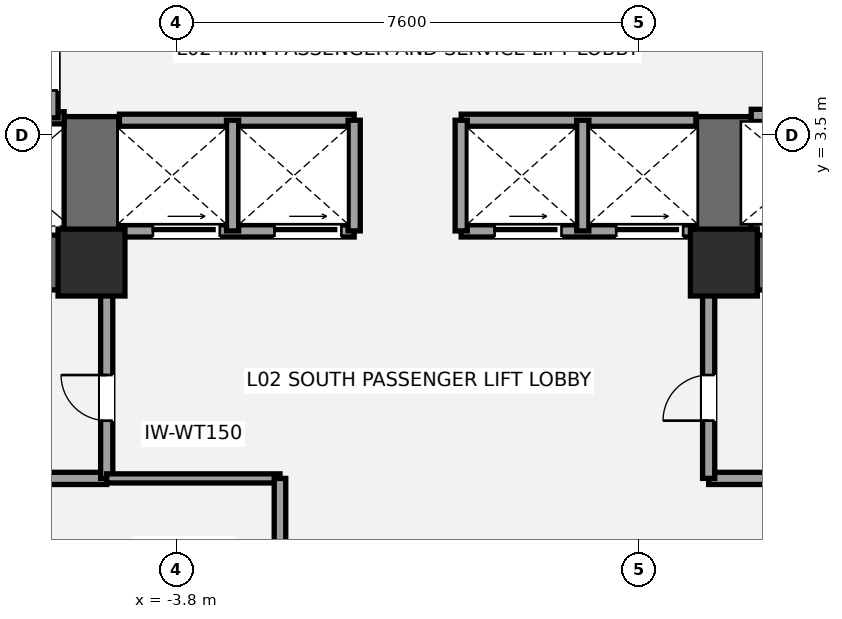
"""IFC4 building model, lengths in metres.
Left out: names, types, materials, properties, quantities, classifications, styles, units other than length and angle.
Written with IfcOpenShell. Run it as: python <this file> out.ifc"""

import sys

from ifc_helpers import new_model, si_unit, direction, frame, frame_2d, origin, origin_2d, place, context, subcontext, project, spatial, rectangle, extrude, element, fill, save


model = new_model("IFC4")
c1 = context("Model", 3, precision=1e-05, world=origin(), true_north=direction((0.0, 1.0)))
c2 = subcontext(c1, "Body", "Model", "MODEL_VIEW")
j1 = project(units=[si_unit("LENGTHUNIT", "METRE"), si_unit("PLANEANGLEUNIT", "RADIAN")], contexts=[c1])
p1 = place(None, origin())
s1 = spatial("IfcSite", under=j1, at=p1, CompositionType="ELEMENT")
p2 = place(p1, origin())
s2 = spatial("IfcBuilding", under=s1, at=p2, CompositionType="ELEMENT")
p3 = place(p2, frame((0.0, 0.0, 10.2)))
s3 = spatial("IfcBuildingStorey", under=s2, at=p3, CompositionType="ELEMENT", Elevation=10.2)
p4 = place(p3, frame((-4.75, 1.4, 0.0), z_axis=(0.0, 0.0, 1.0), x_axis=(-1.0, 0.0, 0.0)))
e1 = element("IfcWall", 1, at=p4, inside=s3, PredefinedType="SHEAR", context=c2, shape_type="SweptSolid", body=[
    extrude(rectangle(XDim=9.3, YDim=0.9, at=frame_2d((4.65, 0.0))), origin(), (0.0, 0.0, 1.0), 4.2),
])
p5 = place(p4, frame((5.55, 0.0, 0.0)))
e2 = element("IfcOpeningElement", 2, at=p5, cuts=e1, PredefinedType="OPENING", context=c2, shape_type="SweptSolid", body=[
    extrude(rectangle(XDim=1.05, YDim=2.15, at=frame_2d((0.525, 1.075))), frame((0.0, 0.46, 0.0), z_axis=(0.0, -1.0, 0.0), x_axis=(1.0, 0.0, 0.0)), (0.0, 0.0, 1.0), 0.92),
])
p6 = place(p4, frame((3.88, 0.0, 0.0)))
e3 = element("IfcOpeningElement", 3, at=p6, cuts=e1, PredefinedType="OPENING", context=c2, shape_type="SweptSolid", body=[
    extrude(rectangle(XDim=1.1, YDim=2.2, at=frame_2d((0.55, 1.1))), frame((0.0, 0.46, 0.0), z_axis=(0.0, -1.0, 0.0), x_axis=(1.0, 0.0, 0.0)), (0.0, 0.0, 1.0), 0.92),
])
p7 = place(p3, frame((-5.2, 0.95, 0.0), z_axis=(0.0, 0.0, 1.0), x_axis=(0.0, 1.0, 0.0)))
e4 = element("IfcWall", 4, at=p7, inside=s3, PredefinedType="SHEAR", context=c2, shape_type="SweptSolid", body=[
    extrude(rectangle(XDim=2.85, YDim=0.9, at=frame_2d((1.425, 0.0))), origin(), (0.0, 0.0, 1.0), 4.2),
])
p8 = place(p3, frame((14.05, 1.4, 0.0), z_axis=(0.0, 0.0, 1.0), x_axis=(-1.0, 0.0, 0.0)))
e5 = element("IfcWall", 5, at=p8, inside=s3, PredefinedType="SHEAR", context=c2, shape_type="SweptSolid", body=[
    extrude(rectangle(XDim=9.3, YDim=0.9, at=frame_2d((4.65, 0.0))), origin(), (0.0, 0.0, 1.0), 4.2),
])
p9 = place(p8, frame((2.7, 0.0, 0.0)))
e6 = element("IfcOpeningElement", 6, at=p9, cuts=e5, PredefinedType="OPENING", context=c2, shape_type="SweptSolid", body=[
    extrude(rectangle(XDim=1.05, YDim=2.15, at=frame_2d((0.525, 1.075))), frame((0.0, 0.46, 0.0), z_axis=(0.0, -1.0, 0.0), x_axis=(1.0, 0.0, 0.0)), (0.0, 0.0, 1.0), 0.92),
])
p10 = place(p8, frame((4.7, 0.0, 0.0)))
e7 = element("IfcOpeningElement", 7, at=p10, cuts=e5, PredefinedType="OPENING", context=c2, shape_type="SweptSolid", body=[
    extrude(rectangle(XDim=1.1, YDim=2.2, at=frame_2d((0.55, 1.1))), frame((0.0, 0.46, 0.0), z_axis=(0.0, -1.0, 0.0), x_axis=(1.0, 0.0, 0.0)), (0.0, 0.0, 1.0), 0.92),
])
p11 = place(p3, frame((5.2, 0.95, 0.0), z_axis=(0.0, 0.0, 1.0), x_axis=(0.0, 1.0, 0.0)))
e8 = element("IfcWall", 8, at=p11, inside=s3, PredefinedType="SHEAR", context=c2, shape_type="SweptSolid", body=[
    extrude(rectangle(XDim=2.85, YDim=0.9, at=frame_2d((1.425, 0.0))), origin(), (0.0, 0.0, 1.0), 4.2),
])
for number, where, z_axis, x_axis in (
    (9, (-5.2, 1.4, 0.0), (0.0, 0.0, 1.0), (1.0, 0.0, 0.0)),
    (10, (5.2, 1.4, 0.0), (0.0, 0.0, 1.0), (1.0, 0.0, 0.0)),
):
    element("IfcColumn", number, at=place(p3, frame(where, z_axis=z_axis, x_axis=x_axis)), inside=s3, PredefinedType="COLUMN", context=c2, shape_type="SweptSolid", body=[
        extrude(rectangle(XDim=1.1, YDim=1.1, at=origin_2d()), origin(), (0.0, 0.0, 1.0), 4.2),
    ])
p12 = place(p3, frame((-7.2, -2.15, 0.0), z_axis=(0.0, 0.0, 1.0), x_axis=(1.0, 0.0, 0.0)))
e11 = element("IfcWall", 11, at=p12, inside=s3, PredefinedType="SOLIDWALL", context=c2, shape_type="SweptSolid", body=[
    extrude(rectangle(XDim=2.25, YDim=0.2, at=frame_2d((1.125, 0.0))), origin(), (0.0, 0.0, 1.0), 3.98),
])
p13 = place(p3, frame((-4.95, -2.15, 0.0), z_axis=(0.0, 0.0, 1.0), x_axis=(0.0, 1.0, 0.0)))
e12 = element("IfcWall", 12, at=p13, inside=s3, PredefinedType="SOLIDWALL", context=c2, shape_type="SweptSolid", body=[
    extrude(rectangle(XDim=3.15, YDim=0.2, at=frame_2d((1.575, 0.0))), origin(), (0.0, 0.0, 1.0), 3.348),
])
p14 = place(p13, frame((0.95, 0.0, 0.0)))
e13 = element("IfcOpeningElement", 13, at=p14, cuts=e12, PredefinedType="OPENING", context=c2, shape_type="SweptSolid", body=[
    extrude(rectangle(XDim=0.75, YDim=2.1, at=frame_2d((0.375, 1.05))), frame((0.0, 0.11, 0.0), z_axis=(0.0, -1.0, 0.0), x_axis=(1.0, 0.0, 0.0)), (0.0, 0.0, 1.0), 0.22),
])
p15 = place(p3, frame((4.95, -2.15, 0.0), z_axis=(0.0, 0.0, 1.0), x_axis=(1.0, 0.0, 0.0)))
e14 = element("IfcWall", 14, at=p15, inside=s3, PredefinedType="SOLIDWALL", context=c2, shape_type="SweptSolid", body=[
    extrude(rectangle(XDim=2.25, YDim=0.2, at=frame_2d((1.125, 0.0))), origin(), (0.0, 0.0, 1.0), 3.98),
])
p16 = place(p3, frame((4.95, -2.15, 0.0), z_axis=(0.0, 0.0, 1.0), x_axis=(0.0, 1.0, 0.0)))
e15 = element("IfcWall", 15, at=p16, inside=s3, PredefinedType="SOLIDWALL", context=c2, shape_type="SweptSolid", body=[
    extrude(rectangle(XDim=3.15, YDim=0.2, at=frame_2d((1.575, 0.0))), origin(), (0.0, 0.0, 1.0), 3.348),
])
p17 = place(p16, frame((0.95, 0.0, 0.0)))
e16 = element("IfcOpeningElement", 16, at=p17, cuts=e15, PredefinedType="OPENING", context=c2, shape_type="SweptSolid", body=[
    extrude(rectangle(XDim=0.75, YDim=2.1, at=frame_2d((0.375, 1.05))), frame((0.0, 0.11, 0.0), z_axis=(0.0, -1.0, 0.0), x_axis=(1.0, 0.0, 0.0)), (0.0, 0.0, 1.0), 0.22),
])
p18 = place(p3, frame((-9.78, 3.78, 0.0), z_axis=(0.0, 0.0, 1.0), x_axis=(1.0, 0.0, 0.0)))
e17 = element("IfcWall", 17, at=p18, inside=s3, PredefinedType="SOLIDWALL", context=c2, shape_type="SweptSolid", body=[
    extrude(rectangle(XDim=4.13, YDim=0.2, at=frame_2d((2.065, 0.0))), origin(), (0.0, 0.0, 1.0), 3.98),
])
p19 = place(p3, frame((-5.85, 3.78, 0.0), z_axis=(0.0, 0.0, 1.0), x_axis=(0.0, 1.0, 0.0)))
e18 = element("IfcWall", 18, at=p19, inside=s3, PredefinedType="SOLIDWALL", context=c2, shape_type="SweptSolid", body=[
    extrude(rectangle(XDim=1.69, YDim=0.2, at=frame_2d((0.845, 0.0))), origin(), (0.0, 0.0, 1.0), 3.98),
])
p20 = place(p19, frame((0.45, 0.0, 0.0)))
e19 = element("IfcOpeningElement", 19, at=p20, cuts=e18, PredefinedType="OPENING", context=c2, shape_type="SweptSolid", body=[
    extrude(rectangle(XDim=0.75, YDim=2.1, at=frame_2d((0.375, 1.05))), frame((0.0, 0.11, 0.0), z_axis=(0.0, -1.0, 0.0), x_axis=(1.0, 0.0, 0.0)), (0.0, 0.0, 1.0), 0.22),
])
p21 = place(p3, frame((5.65, 3.82, 0.0), z_axis=(0.0, 0.0, 1.0), x_axis=(1.0, 0.0, 0.0)))
e20 = element("IfcWall", 20, at=p21, inside=s3, PredefinedType="SOLIDWALL", context=c2, shape_type="SweptSolid", body=[
    extrude(rectangle(XDim=4.13, YDim=0.2, at=frame_2d((2.065, 0.0))), origin(), (0.0, 0.0, 1.0), 3.98),
])
p22 = place(p21, frame((0.65, 0.0, 0.0)))
e21 = element("IfcOpeningElement", 21, at=p22, cuts=e20, PredefinedType="OPENING", context=c2, shape_type="SweptSolid", body=[
    extrude(rectangle(XDim=1.2, YDim=2.2, at=frame_2d((0.6, 1.1))), frame((0.0, 0.11, 0.0), z_axis=(0.0, -1.0, 0.0), x_axis=(1.0, 0.0, 0.0)), (0.0, 0.0, 1.0), 0.22),
])
p23 = place(p3, frame((-4.74, 1.92, 0.0), z_axis=(0.0, 0.0, 1.0), x_axis=(1.0, 0.0, 0.0)))
e22 = element("IfcWall", 22, at=p23, inside=s3, PredefinedType="SOLIDWALL", context=c2, shape_type="SweptSolid", body=[
    extrude(rectangle(XDim=3.86, YDim=0.2, at=frame_2d((1.93, 0.0))), origin(), (0.0, 0.0, 1.0), 2.97),
])
p24 = place(p23, frame((0.55, 0.0, 0.0)))
e23 = element("IfcOpeningElement", 23, at=p24, cuts=e22, PredefinedType="OPENING", context=c2, shape_type="SweptSolid", body=[
    extrude(rectangle(XDim=1.1, YDim=2.2, at=frame_2d((0.55, 1.1))), frame((0.0, 0.11, 0.0), z_axis=(0.0, -1.0, 0.0), x_axis=(1.0, 0.0, 0.0)), (0.0, 0.0, 1.0), 0.22),
])
p25 = place(p23, frame((2.55, 0.0, 0.0)))
e24 = element("IfcOpeningElement", 24, at=p25, cuts=e22, PredefinedType="OPENING", context=c2, shape_type="SweptSolid", body=[
    extrude(rectangle(XDim=1.1, YDim=2.2, at=frame_2d((0.55, 1.1))), frame((0.0, 0.11, 0.0), z_axis=(0.0, -1.0, 0.0), x_axis=(1.0, 0.0, 0.0)), (0.0, 0.0, 1.0), 0.22),
])
p26 = place(p3, frame((0.88, 1.92, 0.0), z_axis=(0.0, 0.0, 1.0), x_axis=(1.0, 0.0, 0.0)))
e25 = element("IfcWall", 25, at=p26, inside=s3, PredefinedType="SOLIDWALL", context=c2, shape_type="SweptSolid", body=[
    extrude(rectangle(XDim=3.86, YDim=0.2, at=frame_2d((1.93, 0.0))), origin(), (0.0, 0.0, 1.0), 2.97),
])
p27 = place(p26, frame((0.55, 0.0, 0.0)))
e26 = element("IfcOpeningElement", 26, at=p27, cuts=e25, PredefinedType="OPENING", context=c2, shape_type="SweptSolid", body=[
    extrude(rectangle(XDim=1.1, YDim=2.2, at=frame_2d((0.55, 1.1))), frame((0.0, 0.11, 0.0), z_axis=(0.0, -1.0, 0.0), x_axis=(1.0, 0.0, 0.0)), (0.0, 0.0, 1.0), 0.22),
])
p28 = place(p26, frame((2.55, 0.0, 0.0)))
e27 = element("IfcOpeningElement", 27, at=p28, cuts=e25, PredefinedType="OPENING", context=c2, shape_type="SweptSolid", body=[
    extrude(rectangle(XDim=1.1, YDim=2.2, at=frame_2d((0.55, 1.1))), frame((0.0, 0.11, 0.0), z_axis=(0.0, -1.0, 0.0), x_axis=(1.0, 0.0, 0.0)), (0.0, 0.0, 1.0), 0.22),
])
for number, where, z_axis, x_axis in (
    (28, (-4.74, 3.74, 0.0), (0.0, 0.0, 1.0), (1.0, 0.0, 0.0)),
    (29, (0.88, 3.74, 0.0), (0.0, 0.0, 1.0), (1.0, 0.0, 0.0)),
):
    element("IfcWall", number, at=place(p3, frame(where, z_axis=z_axis, x_axis=x_axis)), inside=s3, PredefinedType="SOLIDWALL", context=c2, shape_type="SweptSolid", body=[
        extrude(rectangle(XDim=3.86, YDim=0.2, at=frame_2d((1.93, 0.0))), origin(), (0.0, 0.0, 1.0), 3.98),
    ])
for number, where, z_axis, x_axis in (
    (30, (-2.88, 1.92, 0.0), (0.0, 0.0, 1.0), (0.0, 1.0, 0.0)),
    (31, (2.88, 1.92, 0.0), (0.0, 0.0, 1.0), (0.0, 1.0, 0.0)),
    (32, (-0.88, 1.92, 0.0), (0.0, 0.0, 1.0), (0.0, 1.0, 0.0)),
    (33, (0.88, 1.92, 0.0), (0.0, 0.0, 1.0), (0.0, 1.0, 0.0)),
):
    element("IfcWall", number, at=place(p3, frame(where, z_axis=z_axis, x_axis=x_axis)), inside=s3, PredefinedType="SOLIDWALL", context=c2, shape_type="SweptSolid", body=[
        extrude(rectangle(XDim=1.82, YDim=0.2, at=frame_2d((0.91, 0.0))), origin(), (0.0, 0.0, 1.0), 3.98),
    ])
p29 = place(p3, frame((-4.95, -2.15, 0.0), z_axis=(0.0, 0.0, 1.0), x_axis=(1.0, 0.0, 0.0)))
e34 = element("IfcWall", 34, at=p29, inside=s3, PredefinedType="PLUMBINGWALL", context=c2, shape_type="SweptSolid", body=[
    extrude(rectangle(XDim=2.85, YDim=0.15, at=frame_2d((1.425, 0.0))), origin(), (0.0, 0.0, 1.0), 3.98),
])
p30 = place(p3, frame((-2.1, -4.05, 0.0), z_axis=(0.0, 0.0, 1.0), x_axis=(0.0, 1.0, 0.0)))
e35 = element("IfcWall", 35, at=p30, inside=s3, PredefinedType="PLUMBINGWALL", context=c2, shape_type="SweptSolid", body=[
    extrude(rectangle(XDim=1.9, YDim=0.19, at=frame_2d((0.95, 0.0))), origin(), (0.0, 0.0, 1.0), 3.98),
])
p31 = place(p14, origin())
e36 = element("IfcDoor", 36, at=p31, inside=s3, OperationType="SINGLE_SWING_RIGHT", PredefinedType="DOOR", context=c2, shape_type="SweptSolid", body=[
    extrude(rectangle(XDim=0.75, YDim=2.1, at=frame_2d((0.375, 1.05))), frame((0.0, 0.025, 0.0), z_axis=(0.0, -1.0, 0.0), x_axis=(1.0, 0.0, 0.0)), (0.0, 0.0, 1.0), 0.05),
])
fill(e13, e36)
p32 = place(p17, origin())
e37 = element("IfcDoor", 37, at=p32, inside=s3, OperationType="SINGLE_SWING_LEFT", PredefinedType="DOOR", context=c2, shape_type="SweptSolid", body=[
    extrude(rectangle(XDim=0.75, YDim=2.1, at=frame_2d((0.375, 1.05))), frame((0.0, 0.025, 0.0), z_axis=(0.0, -1.0, 0.0), x_axis=(1.0, 0.0, 0.0)), (0.0, 0.0, 1.0), 0.05),
])
fill(e16, e37)
p33 = place(p20, origin())
e38 = element("IfcDoor", 38, at=p33, inside=s3, OperationType="SINGLE_SWING_RIGHT", PredefinedType="DOOR", context=c2, shape_type="SweptSolid", body=[
    extrude(rectangle(XDim=0.75, YDim=2.1, at=frame_2d((0.375, 1.05))), frame((0.0, 0.025, 0.0), z_axis=(0.0, -1.0, 0.0), x_axis=(1.0, 0.0, 0.0)), (0.0, 0.0, 1.0), 0.05),
])
fill(e19, e38)
p34 = place(p24, origin())
e39 = element("IfcDoor", 39, at=p34, inside=s3, OperationType="SLIDING_TO_LEFT", PredefinedType="DOOR", context=c2, shape_type="SweptSolid", body=[
    extrude(rectangle(XDim=1.1, YDim=2.2, at=frame_2d((0.55, 1.1))), frame((0.0, 0.025, 0.0), z_axis=(0.0, -1.0, 0.0), x_axis=(1.0, 0.0, 0.0)), (0.0, 0.0, 1.0), 0.05),
])
fill(e23, e39)
p35 = place(p25, origin())
e40 = element("IfcDoor", 40, at=p35, inside=s3, OperationType="SLIDING_TO_LEFT", PredefinedType="DOOR", context=c2, shape_type="SweptSolid", body=[
    extrude(rectangle(XDim=1.1, YDim=2.2, at=frame_2d((0.55, 1.1))), frame((0.0, 0.025, 0.0), z_axis=(0.0, -1.0, 0.0), x_axis=(1.0, 0.0, 0.0)), (0.0, 0.0, 1.0), 0.05),
])
fill(e24, e40)
p36 = place(p27, origin())
e41 = element("IfcDoor", 41, at=p36, inside=s3, OperationType="SLIDING_TO_LEFT", PredefinedType="DOOR", context=c2, shape_type="SweptSolid", body=[
    extrude(rectangle(XDim=1.1, YDim=2.2, at=frame_2d((0.55, 1.1))), frame((0.0, 0.025, 0.0), z_axis=(0.0, -1.0, 0.0), x_axis=(1.0, 0.0, 0.0)), (0.0, 0.0, 1.0), 0.05),
])
fill(e26, e41)
p37 = place(p28, origin())
e42 = element("IfcDoor", 42, at=p37, inside=s3, OperationType="SLIDING_TO_LEFT", PredefinedType="DOOR", context=c2, shape_type="SweptSolid", body=[
    extrude(rectangle(XDim=1.1, YDim=2.2, at=frame_2d((0.55, 1.1))), frame((0.0, 0.025, 0.0), z_axis=(0.0, -1.0, 0.0), x_axis=(1.0, 0.0, 0.0)), (0.0, 0.0, 1.0), 0.05),
])
fill(e27, e42)
save(model, sys.argv[1])
